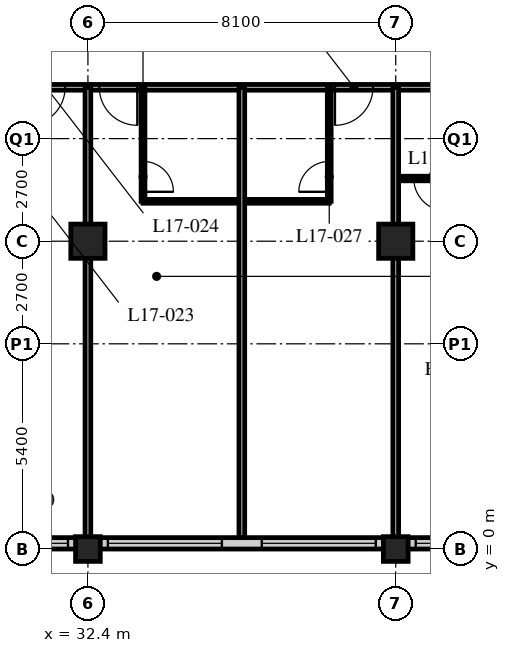
"""IFC4 building model, lengths in metres.
Left out: names, types, materials, properties, quantities, classifications, styles, units other than length and angle.
Written with IfcOpenShell. Run it as: python <this file> out.ifc"""

import sys

from ifc_helpers import new_model, si_unit, direction, frame, frame_2d, origin, origin_2d, place, context, subcontext, project, spatial, rectangle, hollow_rectangle, extrude, element, fill, save


model = new_model("IFC4")
c1 = context("Model", 3, precision=1e-05, world=origin(), true_north=direction((0.0, 1.0)))
c2 = subcontext(c1, "Body", "Model", "MODEL_VIEW")
j1 = project(units=[si_unit("LENGTHUNIT", "METRE"), si_unit("PLANEANGLEUNIT", "RADIAN")], contexts=[c1])
p1 = place(None, origin())
s1 = spatial("IfcSite", under=j1, at=p1, CompositionType="ELEMENT")
p2 = place(p1, origin())
s2 = spatial("IfcBuilding", under=s1, at=p2, CompositionType="ELEMENT")
p3 = place(p2, frame((0.0, 0.0, 70.4)))
s3 = spatial("IfcBuildingStorey", under=s2, at=p3, CompositionType="ELEMENT", Elevation=70.4)
p4 = place(p3, frame((32.4, 0.0, 0.0), z_axis=(0.0, 0.0, 1.0), x_axis=(1.0, 0.0, 0.0)))
e1 = element("IfcColumn", 1, at=p4, inside=s3, PredefinedType="COLUMN", context=c2, shape_type="SweptSolid", body=[
    extrude(hollow_rectangle(XDim=0.65, YDim=0.65, WallThickness=0.05, at=origin_2d()), origin(), (0.0, 0.0, 1.0), 3.4),
])
p5 = place(p3, frame((32.4, 8.1, 0.0), z_axis=(0.0, 0.0, 1.0), x_axis=(1.0, 0.0, 0.0)))
e2 = element("IfcColumn", 2, at=p5, inside=s3, PredefinedType="COLUMN", context=c2, shape_type="SweptSolid", body=[
    extrude(hollow_rectangle(XDim=0.9, YDim=0.9, WallThickness=0.09, at=origin_2d()), origin(), (0.0, 0.0, 1.0), 3.4),
])
p6 = place(p3, frame((40.5, 0.0, 0.0), z_axis=(0.0, 0.0, 1.0), x_axis=(1.0, 0.0, 0.0)))
e3 = element("IfcColumn", 3, at=p6, inside=s3, PredefinedType="COLUMN", context=c2, shape_type="SweptSolid", body=[
    extrude(hollow_rectangle(XDim=0.65, YDim=0.65, WallThickness=0.05, at=origin_2d()), origin(), (0.0, 0.0, 1.0), 3.4),
])
p7 = place(p3, frame((40.5, 8.1, 0.0), z_axis=(0.0, 0.0, 1.0), x_axis=(1.0, 0.0, 0.0)))
e4 = element("IfcColumn", 4, at=p7, inside=s3, PredefinedType="COLUMN", context=c2, shape_type="SweptSolid", body=[
    extrude(hollow_rectangle(XDim=0.9, YDim=0.9, WallThickness=0.09, at=origin_2d()), origin(), (0.0, 0.0, 1.0), 3.4),
])
p8 = place(p3, frame((8.4, 0.15, 0.0), z_axis=(0.0, 0.0, 1.0), x_axis=(1.0, 0.0, 0.0)))
e5 = element("IfcWall", 5, at=p8, inside=s3, PredefinedType="SOLIDWALL", context=c2, shape_type="SweptSolid", body=[
    extrude(rectangle(XDim=40.2, YDim=0.3, at=frame_2d((20.1, 0.0))), origin(), (0.0, 0.0, 1.0), 3.19),
])
p9 = place(p8, frame((0.225, 0.0, 0.9)))
e6 = element("IfcOpeningElement", 6, at=p9, cuts=e5, PredefinedType="OPENING", context=c2, shape_type="SweptSolid", body=[
    extrude(rectangle(XDim=3.0, YDim=2.0, at=frame_2d((1.5, 1.0))), frame((0.0, 0.16, 0.0), z_axis=(0.0, -1.0, 0.0), x_axis=(1.0, 0.0, 0.0)), (0.0, 0.0, 1.0), 0.32),
])
p10 = place(p8, frame((4.275, 0.0, 0.9)))
e7 = element("IfcOpeningElement", 7, at=p10, cuts=e5, PredefinedType="OPENING", context=c2, shape_type="SweptSolid", body=[
    extrude(rectangle(XDim=3.0, YDim=2.0, at=frame_2d((1.5, 1.0))), frame((0.0, 0.16, 0.0), z_axis=(0.0, -1.0, 0.0), x_axis=(1.0, 0.0, 0.0)), (0.0, 0.0, 1.0), 0.32),
])
p11 = place(p8, frame((8.325, 0.0, 0.9)))
e8 = element("IfcOpeningElement", 8, at=p11, cuts=e5, PredefinedType="OPENING", context=c2, shape_type="SweptSolid", body=[
    extrude(rectangle(XDim=3.0, YDim=2.0, at=frame_2d((1.5, 1.0))), frame((0.0, 0.16, 0.0), z_axis=(0.0, -1.0, 0.0), x_axis=(1.0, 0.0, 0.0)), (0.0, 0.0, 1.0), 0.32),
])
p12 = place(p8, frame((12.375, 0.0, 0.9)))
e9 = element("IfcOpeningElement", 9, at=p12, cuts=e5, PredefinedType="OPENING", context=c2, shape_type="SweptSolid", body=[
    extrude(rectangle(XDim=3.0, YDim=2.0, at=frame_2d((1.5, 1.0))), frame((0.0, 0.16, 0.0), z_axis=(0.0, -1.0, 0.0), x_axis=(1.0, 0.0, 0.0)), (0.0, 0.0, 1.0), 0.32),
])
p13 = place(p8, frame((16.425, 0.0, 0.9)))
e10 = element("IfcOpeningElement", 10, at=p13, cuts=e5, PredefinedType="OPENING", context=c2, shape_type="SweptSolid", body=[
    extrude(rectangle(XDim=3.0, YDim=2.0, at=frame_2d((1.5, 1.0))), frame((0.0, 0.16, 0.0), z_axis=(0.0, -1.0, 0.0), x_axis=(1.0, 0.0, 0.0)), (0.0, 0.0, 1.0), 0.32),
])
p14 = place(p8, frame((20.475, 0.0, 0.9)))
e11 = element("IfcOpeningElement", 11, at=p14, cuts=e5, PredefinedType="OPENING", context=c2, shape_type="SweptSolid", body=[
    extrude(rectangle(XDim=3.0, YDim=2.0, at=frame_2d((1.5, 1.0))), frame((0.0, 0.16, 0.0), z_axis=(0.0, -1.0, 0.0), x_axis=(1.0, 0.0, 0.0)), (0.0, 0.0, 1.0), 0.32),
])
p15 = place(p8, frame((24.525, 0.0, 0.9)))
e12 = element("IfcOpeningElement", 12, at=p15, cuts=e5, PredefinedType="OPENING", context=c2, shape_type="SweptSolid", body=[
    extrude(rectangle(XDim=3.0, YDim=2.0, at=frame_2d((1.5, 1.0))), frame((0.0, 0.16, 0.0), z_axis=(0.0, -1.0, 0.0), x_axis=(1.0, 0.0, 0.0)), (0.0, 0.0, 1.0), 0.32),
])
p16 = place(p8, frame((28.575, 0.0, 0.9)))
e13 = element("IfcOpeningElement", 13, at=p16, cuts=e5, PredefinedType="OPENING", context=c2, shape_type="SweptSolid", body=[
    extrude(rectangle(XDim=3.0, YDim=2.0, at=frame_2d((1.5, 1.0))), frame((0.0, 0.16, 0.0), z_axis=(0.0, -1.0, 0.0), x_axis=(1.0, 0.0, 0.0)), (0.0, 0.0, 1.0), 0.32),
])
p17 = place(p8, frame((32.625, 0.0, 0.9)))
e14 = element("IfcOpeningElement", 14, at=p17, cuts=e5, PredefinedType="OPENING", context=c2, shape_type="SweptSolid", body=[
    extrude(rectangle(XDim=3.0, YDim=2.0, at=frame_2d((1.5, 1.0))), frame((0.0, 0.16, 0.0), z_axis=(0.0, -1.0, 0.0), x_axis=(1.0, 0.0, 0.0)), (0.0, 0.0, 1.0), 0.32),
])
p18 = place(p8, frame((36.675, 0.0, 0.9)))
e15 = element("IfcOpeningElement", 15, at=p18, cuts=e5, PredefinedType="OPENING", context=c2, shape_type="SweptSolid", body=[
    extrude(rectangle(XDim=3.0, YDim=2.0, at=frame_2d((1.5, 1.0))), frame((0.0, 0.16, 0.0), z_axis=(0.0, -1.0, 0.0), x_axis=(1.0, 0.0, 0.0)), (0.0, 0.0, 1.0), 0.32),
])
p19 = place(p3, frame((8.1, 12.15, 0.0), z_axis=(0.0, 0.0, 1.0), x_axis=(1.0, 0.0, 0.0)))
e16 = element("IfcWall", 16, at=p19, inside=s3, PredefinedType="PARTITIONING", context=c2, shape_type="SweptSolid", body=[
    extrude(rectangle(XDim=36.45, YDim=0.15, at=frame_2d((18.225, 0.0))), origin(), (0.0, 0.0, 1.0), 3.19),
])
p20 = place(p19, frame((4.35, 0.0, 0.0)))
e17 = element("IfcOpeningElement", 17, at=p20, cuts=e16, PredefinedType="OPENING", context=c2, shape_type="SweptSolid", body=[
    extrude(rectangle(XDim=1.0, YDim=2.1, at=frame_2d((0.5, 1.05))), frame((0.0, 0.085, 0.0), z_axis=(0.0, -1.0, 0.0), x_axis=(1.0, 0.0, 0.0)), (0.0, 0.0, 1.0), 0.17),
])
p21 = place(p19, frame((10.55, 0.0, 0.0)))
e18 = element("IfcOpeningElement", 18, at=p21, cuts=e16, PredefinedType="OPENING", context=c2, shape_type="SweptSolid", body=[
    extrude(rectangle(XDim=1.0, YDim=2.1, at=frame_2d((0.5, 1.05))), frame((0.0, 0.085, 0.0), z_axis=(0.0, -1.0, 0.0), x_axis=(1.0, 0.0, 0.0)), (0.0, 0.0, 1.0), 0.17),
])
p22 = place(p19, frame((14.6, 0.0, 0.0)))
e19 = element("IfcOpeningElement", 19, at=p22, cuts=e16, PredefinedType="OPENING", context=c2, shape_type="SweptSolid", body=[
    extrude(rectangle(XDim=1.0, YDim=2.1, at=frame_2d((0.5, 1.05))), frame((0.0, 0.085, 0.0), z_axis=(0.0, -1.0, 0.0), x_axis=(1.0, 0.0, 0.0)), (0.0, 0.0, 1.0), 0.17),
])
p23 = place(p19, frame((18.65, 0.0, 0.0)))
e20 = element("IfcOpeningElement", 20, at=p23, cuts=e16, PredefinedType="OPENING", context=c2, shape_type="SweptSolid", body=[
    extrude(rectangle(XDim=1.0, YDim=2.1, at=frame_2d((0.5, 1.05))), frame((0.0, 0.085, 0.0), z_axis=(0.0, -1.0, 0.0), x_axis=(1.0, 0.0, 0.0)), (0.0, 0.0, 1.0), 0.17),
])
p24 = place(p19, frame((22.7, 0.0, 0.0)))
e21 = element("IfcOpeningElement", 21, at=p24, cuts=e16, PredefinedType="OPENING", context=c2, shape_type="SweptSolid", body=[
    extrude(rectangle(XDim=1.0, YDim=2.1, at=frame_2d((0.5, 1.05))), frame((0.0, 0.085, 0.0), z_axis=(0.0, -1.0, 0.0), x_axis=(1.0, 0.0, 0.0)), (0.0, 0.0, 1.0), 0.17),
])
p25 = place(p19, frame((24.6, 0.0, 0.0)))
e22 = element("IfcOpeningElement", 22, at=p25, cuts=e16, PredefinedType="OPENING", context=c2, shape_type="SweptSolid", body=[
    extrude(rectangle(XDim=1.0, YDim=2.1, at=frame_2d((0.5, 1.05))), frame((0.0, 0.085, 0.0), z_axis=(0.0, -1.0, 0.0), x_axis=(1.0, 0.0, 0.0)), (0.0, 0.0, 1.0), 0.17),
])
p26 = place(p19, frame((30.8, 0.0, 0.0)))
e23 = element("IfcOpeningElement", 23, at=p26, cuts=e16, PredefinedType="OPENING", context=c2, shape_type="SweptSolid", body=[
    extrude(rectangle(XDim=1.0, YDim=2.1, at=frame_2d((0.5, 1.05))), frame((0.0, 0.085, 0.0), z_axis=(0.0, -1.0, 0.0), x_axis=(1.0, 0.0, 0.0)), (0.0, 0.0, 1.0), 0.17),
])
p27 = place(p19, frame((1.525, 0.0, 0.0)))
e24 = element("IfcOpeningElement", 24, at=p27, cuts=e16, PredefinedType="OPENING", context=c2, shape_type="SweptSolid", body=[
    extrude(rectangle(XDim=1.0, YDim=2.1, at=frame_2d((0.5, 1.05))), frame((0.0, 0.085, 0.0), z_axis=(0.0, -1.0, 0.0), x_axis=(1.0, 0.0, 0.0)), (0.0, 0.0, 1.0), 0.17),
])
p28 = place(p19, frame((33.925, 0.0, 0.0)))
e25 = element("IfcOpeningElement", 25, at=p28, cuts=e16, PredefinedType="OPENING", context=c2, shape_type="SweptSolid", body=[
    extrude(rectangle(XDim=1.0, YDim=2.1, at=frame_2d((0.5, 1.05))), frame((0.0, 0.085, 0.0), z_axis=(0.0, -1.0, 0.0), x_axis=(1.0, 0.0, 0.0)), (0.0, 0.0, 1.0), 0.17),
])
p29 = place(p3, frame((32.4, 12.15, 0.0), z_axis=(0.0, 0.0, 1.0), x_axis=(0.0, -1.0, 0.0)))
e26 = element("IfcWall", 26, at=p29, inside=s3, PredefinedType="PARTITIONING", context=c2, shape_type="SweptSolid", body=[
    extrude(rectangle(XDim=11.85, YDim=0.15, at=frame_2d((5.925, 0.0))), origin(), (0.0, 0.0, 1.0), 2.578),
])
p30 = place(p3, frame((33.85, 9.15, 0.0), z_axis=(0.0, 0.0, 1.0), x_axis=(1.0, 0.0, 0.0)))
e27 = element("IfcWall", 27, at=p30, inside=s3, PredefinedType="PARTITIONING", context=c2, shape_type="SweptSolid", body=[
    extrude(rectangle(XDim=4.9, YDim=0.1, at=frame_2d((2.45, 0.0))), origin(), (0.0, 0.0, 1.0), 3.19),
])
p31 = place(p3, frame((33.85, 12.15, 0.0), z_axis=(0.0, 0.0, 1.0), x_axis=(0.0, -1.0, 0.0)))
e28 = element("IfcWall", 28, at=p31, inside=s3, PredefinedType="PARTITIONING", context=c2, shape_type="SweptSolid", body=[
    extrude(rectangle(XDim=3.0, YDim=0.1, at=frame_2d((1.5, 0.0))), origin(), (0.0, 0.0, 1.0), 3.19),
])
p32 = place(p31, frame((1.95, 0.0, 0.0)))
e29 = element("IfcOpeningElement", 29, at=p32, cuts=e28, PredefinedType="OPENING", context=c2, shape_type="SweptSolid", body=[
    extrude(rectangle(XDim=0.8, YDim=2.1, at=frame_2d((0.4, 1.05))), frame((0.0, 0.06, 0.0), z_axis=(0.0, -1.0, 0.0), x_axis=(1.0, 0.0, 0.0)), (0.0, 0.0, 1.0), 0.12),
])
p33 = place(p3, frame((36.45, 12.15, 0.0), z_axis=(0.0, 0.0, 1.0), x_axis=(0.0, -1.0, 0.0)))
e30 = element("IfcWall", 30, at=p33, inside=s3, PredefinedType="PARTITIONING", context=c2, shape_type="SweptSolid", body=[
    extrude(rectangle(XDim=11.85, YDim=0.15, at=frame_2d((5.925, 0.0))), origin(), (0.0, 0.0, 1.0), 3.19),
])
p34 = place(p3, frame((38.75, 12.15, 0.0), z_axis=(0.0, 0.0, 1.0), x_axis=(0.0, -1.0, 0.0)))
e31 = element("IfcWall", 31, at=p34, inside=s3, PredefinedType="PARTITIONING", context=c2, shape_type="SweptSolid", body=[
    extrude(rectangle(XDim=3.0, YDim=0.1, at=frame_2d((1.5, 0.0))), origin(), (0.0, 0.0, 1.0), 3.19),
])
p35 = place(p34, frame((1.95, 0.0, 0.0)))
e32 = element("IfcOpeningElement", 32, at=p35, cuts=e31, PredefinedType="OPENING", context=c2, shape_type="SweptSolid", body=[
    extrude(rectangle(XDim=0.8, YDim=2.1, at=frame_2d((0.4, 1.05))), frame((0.0, 0.06, 0.0), z_axis=(0.0, -1.0, 0.0), x_axis=(1.0, 0.0, 0.0)), (0.0, 0.0, 1.0), 0.12),
])
p36 = place(p3, frame((40.5, 9.75, 0.0), z_axis=(0.0, 0.0, 1.0), x_axis=(1.0, 0.0, 0.0)))
e33 = element("IfcWall", 33, at=p36, inside=s3, PredefinedType="PARTITIONING", context=c2, shape_type="SweptSolid", body=[
    extrude(rectangle(XDim=8.05, YDim=0.12, at=frame_2d((4.025, 0.0))), origin(), (0.0, 0.0, 1.0), 3.19),
])
p37 = place(p36, frame((0.475, 0.0, 0.0)))
e34 = element("IfcOpeningElement", 34, at=p37, cuts=e33, PredefinedType="OPENING", context=c2, shape_type="SweptSolid", body=[
    extrude(rectangle(XDim=0.85, YDim=2.1, at=frame_2d((0.425, 1.05))), frame((0.0, 0.07, 0.0), z_axis=(0.0, -1.0, 0.0), x_axis=(1.0, 0.0, 0.0)), (0.0, 0.0, 1.0), 0.14),
])
p38 = place(p36, frame((4.325, 0.0, 0.0)))
e35 = element("IfcOpeningElement", 35, at=p38, cuts=e33, PredefinedType="OPENING", context=c2, shape_type="SweptSolid", body=[
    extrude(rectangle(XDim=0.85, YDim=2.1, at=frame_2d((0.425, 1.05))), frame((0.0, 0.07, 0.0), z_axis=(0.0, -1.0, 0.0), x_axis=(1.0, 0.0, 0.0)), (0.0, 0.0, 1.0), 0.14),
])
p39 = place(p3, frame((40.5, 12.15, 0.0), z_axis=(0.0, 0.0, 1.0), x_axis=(0.0, -1.0, 0.0)))
e36 = element("IfcWall", 36, at=p39, inside=s3, PredefinedType="PARTITIONING", context=c2, shape_type="SweptSolid", body=[
    extrude(rectangle(XDim=11.85, YDim=0.15, at=frame_2d((5.925, 0.0))), origin(), (0.0, 0.0, 1.0), 2.578),
])
p40 = place(p14, origin())
e37 = element("IfcWindow", 37, at=p40, inside=s3, PartitioningType="SINGLE_PANEL", PredefinedType="WINDOW", context=c2, shape_type="SweptSolid", body=[
    extrude(rectangle(XDim=3.0, YDim=2.0, at=frame_2d((1.5, 1.0))), frame((0.0, 0.03, 0.0), z_axis=(0.0, -1.0, 0.0), x_axis=(1.0, 0.0, 0.0)), (0.0, 0.0, 1.0), 0.06),
])
fill(e11, e37)
p41 = place(p15, origin())
e38 = element("IfcWindow", 38, at=p41, inside=s3, PartitioningType="SINGLE_PANEL", PredefinedType="WINDOW", context=c2, shape_type="SweptSolid", body=[
    extrude(rectangle(XDim=3.0, YDim=2.0, at=frame_2d((1.5, 1.0))), frame((0.0, 0.03, 0.0), z_axis=(0.0, -1.0, 0.0), x_axis=(1.0, 0.0, 0.0)), (0.0, 0.0, 1.0), 0.06),
])
fill(e12, e38)
p42 = place(p16, origin())
e39 = element("IfcWindow", 39, at=p42, inside=s3, PartitioningType="SINGLE_PANEL", PredefinedType="WINDOW", context=c2, shape_type="SweptSolid", body=[
    extrude(rectangle(XDim=3.0, YDim=2.0, at=frame_2d((1.5, 1.0))), frame((0.0, 0.03, 0.0), z_axis=(0.0, -1.0, 0.0), x_axis=(1.0, 0.0, 0.0)), (0.0, 0.0, 1.0), 0.06),
])
fill(e13, e39)
p43 = place(p17, origin())
e40 = element("IfcWindow", 40, at=p43, inside=s3, PartitioningType="SINGLE_PANEL", PredefinedType="WINDOW", context=c2, shape_type="SweptSolid", body=[
    extrude(rectangle(XDim=3.0, YDim=2.0, at=frame_2d((1.5, 1.0))), frame((0.0, 0.03, 0.0), z_axis=(0.0, -1.0, 0.0), x_axis=(1.0, 0.0, 0.0)), (0.0, 0.0, 1.0), 0.06),
])
fill(e14, e40)
p44 = place(p24, origin())
e41 = element("IfcDoor", 41, at=p44, inside=s3, OperationType="SINGLE_SWING_RIGHT", PredefinedType="DOOR", context=c2, shape_type="SweptSolid", body=[
    extrude(rectangle(XDim=1.0, YDim=2.1, at=frame_2d((0.5, 1.05))), frame((0.0, 0.025, 0.0), z_axis=(0.0, -1.0, 0.0), x_axis=(1.0, 0.0, 0.0)), (0.0, 0.0, 1.0), 0.05),
])
fill(e21, e41)
p45 = place(p32, origin())
e42 = element("IfcDoor", 42, at=p45, inside=s3, OperationType="SINGLE_SWING_RIGHT", PredefinedType="DOOR", context=c2, shape_type="SweptSolid", body=[
    extrude(rectangle(XDim=0.8, YDim=2.1, at=frame_2d((0.4, 1.05))), frame((0.0, 0.025, 0.0), z_axis=(0.0, -1.0, 0.0), x_axis=(1.0, 0.0, 0.0)), (0.0, 0.0, 1.0), 0.05),
])
fill(e29, e42)
p46 = place(p25, origin())
e43 = element("IfcDoor", 43, at=p46, inside=s3, OperationType="SINGLE_SWING_LEFT", PredefinedType="DOOR", context=c2, shape_type="SweptSolid", body=[
    extrude(rectangle(XDim=1.0, YDim=2.1, at=frame_2d((0.5, 1.05))), frame((0.0, 0.025, 0.0), z_axis=(0.0, -1.0, 0.0), x_axis=(1.0, 0.0, 0.0)), (0.0, 0.0, 1.0), 0.05),
])
fill(e22, e43)
p47 = place(p35, origin())
e44 = element("IfcDoor", 44, at=p47, inside=s3, OperationType="SINGLE_SWING_LEFT", PredefinedType="DOOR", context=c2, shape_type="SweptSolid", body=[
    extrude(rectangle(XDim=0.8, YDim=2.1, at=frame_2d((0.4, 1.05))), frame((0.0, 0.025, 0.0), z_axis=(0.0, -1.0, 0.0), x_axis=(1.0, 0.0, 0.0)), (0.0, 0.0, 1.0), 0.05),
])
fill(e32, e44)
p48 = place(p26, origin())
e45 = element("IfcDoor", 45, at=p48, inside=s3, OperationType="SINGLE_SWING_RIGHT", PredefinedType="DOOR", context=c2, shape_type="SweptSolid", body=[
    extrude(rectangle(XDim=1.0, YDim=2.1, at=frame_2d((0.5, 1.05))), frame((0.0, 0.025, 0.0), z_axis=(0.0, -1.0, 0.0), x_axis=(1.0, 0.0, 0.0)), (0.0, 0.0, 1.0), 0.05),
])
fill(e23, e45)
p49 = place(p37, origin())
e46 = element("IfcDoor", 46, at=p49, inside=s3, OperationType="SINGLE_SWING_LEFT", PredefinedType="DOOR", context=c2, shape_type="SweptSolid", body=[
    extrude(rectangle(XDim=0.85, YDim=2.1, at=frame_2d((0.425, 1.05))), frame((0.0, 0.025, 0.0), z_axis=(0.0, -1.0, 0.0), x_axis=(1.0, 0.0, 0.0)), (0.0, 0.0, 1.0), 0.05),
])
fill(e34, e46)
save(model, sys.argv[1])
